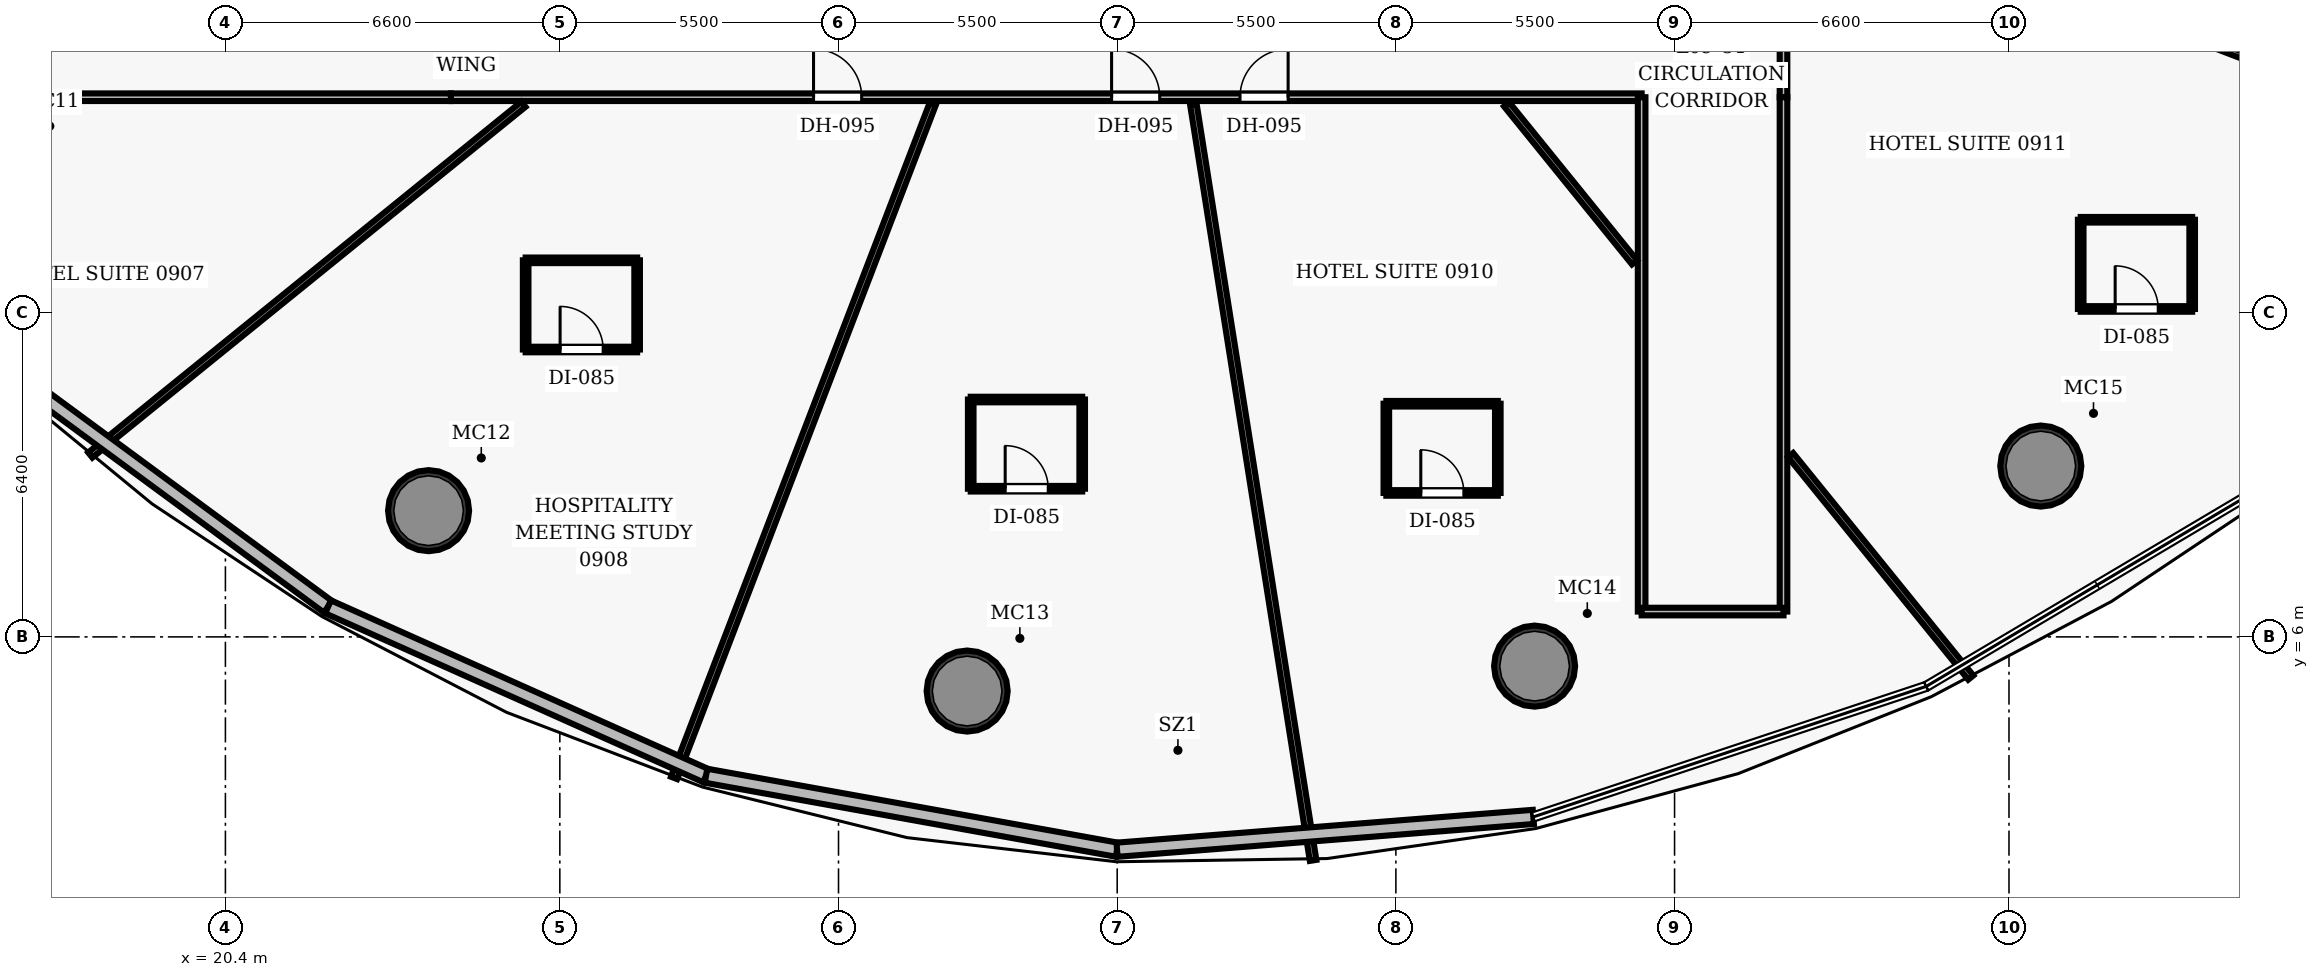
"""IFC4 building model, lengths in metres.
Left out: names, types, materials, properties, quantities, classifications, styles, units other than length and angle.
Written with IfcOpenShell. Run it as: python <this file> out.ifc"""

import sys

from ifc_helpers import new_model, si_unit, direction, frame, frame_2d, origin, origin_2d, place, context, subcontext, project, spatial, rectangle, hollow_circle, extrude, element, fill, save


model = new_model("IFC4")
c1 = context("Model", 3, precision=1e-05, world=origin(), true_north=direction((0.0, 1.0)))
c2 = subcontext(c1, "Body", "Model", "MODEL_VIEW")
j1 = project(units=[si_unit("LENGTHUNIT", "METRE"), si_unit("PLANEANGLEUNIT", "RADIAN")], contexts=[c1])
p1 = place(None, origin())
s1 = spatial("IfcSite", under=j1, at=p1, CompositionType="ELEMENT")
p2 = place(p1, origin())
s2 = spatial("IfcBuilding", under=s1, at=p2, CompositionType="ELEMENT")
p3 = place(p2, frame((0.0, 0.0, 48.4)))
s3 = spatial("IfcBuildingStorey", under=s2, at=p3, CompositionType="ELEMENT", Elevation=48.4)
for number, where, z_axis, x_axis in (
    (1, (24.41, 8.491, 0.0), (0.0, 0.0, 1.0), (1.0, 0.0, 0.0)),
    (2, (35.039, 4.931, 0.0), (0.0, 0.0, 1.0), (1.0, 0.0, 0.0)),
    (3, (46.238, 5.423, 0.0), (0.0, 0.0, 1.0), (1.0, 0.0, 0.0)),
    (4, (56.228, 9.371, 0.0), (0.0, 0.0, 1.0), (1.0, 0.0, 0.0)),
):
    element("IfcColumn", number, at=place(p3, frame(where, z_axis=z_axis, x_axis=x_axis)), inside=s3, PredefinedType="COLUMN", context=c2, shape_type="SweptSolid", body=[
        extrude(hollow_circle(Radius=0.8, WallThickness=0.06, at=origin_2d()), origin(), (0.0, 0.0, 1.0), 3.5),
    ])
p4 = place(p3, frame((24.85, 16.65, 0.0), z_axis=(0.0, 0.0, 1.0), x_axis=(1.0, 0.0, 0.0)))
e5 = element("IfcWall", 5, at=p4, inside=s3, PredefinedType="PARTITIONING", context=c2, shape_type="SweptSolid", body=[
    extrude(rectangle(XDim=23.5, YDim=0.15, at=frame_2d((11.75, 0.0))), origin(), (0.0, 0.0, 1.0), 2.6),
])
p5 = place(p4, frame((7.157, 0.0, 0.0)))
e6 = element("IfcOpeningElement", 6, at=p5, cuts=e5, PredefinedType="OPENING", context=c2, shape_type="SweptSolid", body=[
    extrude(rectangle(XDim=0.95, YDim=2.15, at=frame_2d((0.475, 1.075))), frame((0.0, 0.085, 0.0), z_axis=(0.0, -1.0, 0.0), x_axis=(1.0, 0.0, 0.0)), (0.0, 0.0, 1.0), 0.17),
])
p6 = place(p4, frame((13.039, 0.0, 0.0)))
e7 = element("IfcOpeningElement", 7, at=p6, cuts=e5, PredefinedType="OPENING", context=c2, shape_type="SweptSolid", body=[
    extrude(rectangle(XDim=0.95, YDim=2.15, at=frame_2d((0.475, 1.075))), frame((0.0, 0.085, 0.0), z_axis=(0.0, -1.0, 0.0), x_axis=(1.0, 0.0, 0.0)), (0.0, 0.0, 1.0), 0.17),
])
p7 = place(p4, frame((15.573, 0.0, 0.0)))
e8 = element("IfcOpeningElement", 8, at=p7, cuts=e5, PredefinedType="OPENING", context=c2, shape_type="SweptSolid", body=[
    extrude(rectangle(XDim=0.95, YDim=2.15, at=frame_2d((0.475, 1.075))), frame((0.0, 0.085, 0.0), z_axis=(0.0, -1.0, 0.0), x_axis=(1.0, 0.0, 0.0)), (0.0, 0.0, 1.0), 0.17),
])
p8 = place(p3, frame((51.15, 16.65, 0.0), z_axis=(0.0, 0.0, 1.0), x_axis=(0.0, 1.0, 0.0)))
e9 = element("IfcWall", 9, at=p8, inside=s3, PredefinedType="PARTITIONING", context=c2, shape_type="SweptSolid", body=[
    extrude(rectangle(XDim=15.9, YDim=0.15, at=frame_2d((7.95, 0.0))), origin(), (0.0, 0.0, 1.0), 2.6),
])
p9 = place(p8, frame((2.484, 0.0, 0.0)))
e10 = element("IfcOpeningElement", 10, at=p9, cuts=e9, PredefinedType="OPENING", context=c2, shape_type="SweptSolid", body=[
    extrude(rectangle(XDim=0.95, YDim=2.15, at=frame_2d((0.475, 1.075))), frame((0.0, 0.085, 0.0), z_axis=(0.0, -1.0, 0.0), x_axis=(1.0, 0.0, 0.0)), (0.0, 0.0, 1.0), 0.17),
])
p10 = place(p8, frame((7.379, 0.0, 0.0)))
e11 = element("IfcOpeningElement", 11, at=p10, cuts=e9, PredefinedType="OPENING", context=c2, shape_type="SweptSolid", body=[
    extrude(rectangle(XDim=0.95, YDim=2.15, at=frame_2d((0.475, 1.075))), frame((0.0, 0.085, 0.0), z_axis=(0.0, -1.0, 0.0), x_axis=(1.0, 0.0, 0.0)), (0.0, 0.0, 1.0), 0.17),
])
p11 = place(p3, frame((12.206, 16.65, 0.0), z_axis=(0.0, 0.0, 1.0), x_axis=(1.0, 0.0, 0.0)))
e12 = element("IfcWall", 12, at=p11, inside=s3, PredefinedType="PARTITIONING", context=c2, shape_type="SweptSolid", body=[
    extrude(rectangle(XDim=12.644, YDim=0.15, at=frame_2d((6.322, 0.0))), origin(), (0.0, 0.0, 1.0), 2.6),
])
for number, where, z_axis, x_axis in (
    (13, (48.35, 6.5, 0.0), (0.0, 0.0, 1.0), (0.0, 1.0, 0.0)),
    (14, (51.15, 6.5, 0.0), (0.0, 0.0, 1.0), (0.0, 1.0, 0.0)),
):
    element("IfcWall", number, at=place(p3, frame(where, z_axis=z_axis, x_axis=x_axis)), inside=s3, PredefinedType="PARTITIONING", context=c2, shape_type="SweptSolid", body=[
        extrude(rectangle(XDim=10.15, YDim=0.15, at=frame_2d((5.075, 0.0))), origin(), (0.0, 0.0, 1.0), 2.6),
    ])
p12 = place(p3, frame((48.35, 6.5, 0.0), z_axis=(0.0, 0.0, 1.0), x_axis=(1.0, 0.0, 0.0)))
e15 = element("IfcWall", 15, at=p12, inside=s3, PredefinedType="PARTITIONING", context=c2, shape_type="SweptSolid", body=[
    extrude(rectangle(XDim=2.8, YDim=0.15, at=frame_2d((1.4, 0.0))), origin(), (0.0, 0.0, 1.0), 2.6),
])
p13 = place(p3, frame((26.281, 16.51, 0.0), z_axis=(0.0, 0.0, 1.0), x_axis=(-0.777143021666, -0.629324021372, 0.0)))
e16 = element("IfcWall", 16, at=p13, inside=s3, PredefinedType="PARTITIONING", context=c2, shape_type="SweptSolid", body=[
    extrude(rectangle(XDim=10.998, YDim=0.13, at=frame_2d((5.499, 0.0))), origin(), (0.0, 0.0, 1.0), 2.6),
])
p14 = place(p3, frame((34.357, 16.51, 0.0), z_axis=(0.0, 0.0, 1.0), x_axis=(-0.358367757611, -0.933580500174, 0.0)))
e17 = element("IfcWall", 17, at=p14, inside=s3, PredefinedType="PARTITIONING", context=c2, shape_type="SweptSolid", body=[
    extrude(rectangle(XDim=14.239, YDim=0.13, at=frame_2d((7.12, 0.0))), origin(), (0.0, 0.0, 1.0), 2.6),
])
p15 = place(p3, frame((39.503, 16.51, 0.0), z_axis=(0.0, 0.0, 1.0), x_axis=(0.156421482908, -0.987690396675, 0.0)))
e18 = element("IfcWall", 18, at=p15, inside=s3, PredefinedType="PARTITIONING", context=c2, shape_type="SweptSolid", body=[
    extrude(rectangle(XDim=15.107, YDim=0.13, at=frame_2d((7.553, 0.0))), origin(), (0.0, 0.0, 1.0), 2.6),
])
p16 = place(p3, frame((45.685, 16.51, 0.0), z_axis=(0.0, 0.0, 1.0), x_axis=(0.629306741086, -0.777157014782, 0.0)))
e19 = element("IfcWall", 19, at=p16, inside=s3, PredefinedType="PARTITIONING", context=c2, shape_type="SweptSolid", body=[
    extrude(rectangle(XDim=4.013, YDim=0.13, at=frame_2d((2.006, 0.0))), origin(), (0.0, 0.0, 1.0), 2.6),
])
p17 = place(p3, frame((51.29, 9.588, 0.0), z_axis=(0.0, 0.0, 1.0), x_axis=(0.629326246379, -0.777141219868, 0.0)))
e20 = element("IfcWall", 20, at=p17, inside=s3, PredefinedType="PARTITIONING", context=c2, shape_type="SweptSolid", body=[
    extrude(rectangle(XDim=5.65, YDim=0.13, at=frame_2d((2.825, 0.0))), origin(), (0.0, 0.0, 1.0), 2.6),
])
p18 = place(p3, frame((51.29, 20.898, 0.0), z_axis=(0.0, 0.0, 1.0), x_axis=(0.933579150915, -0.358371272533, 0.0)))
e21 = element("IfcWall", 21, at=p18, inside=s3, PredefinedType="PARTITIONING", context=c2, shape_type="SweptSolid", body=[
    extrude(rectangle(XDim=16.879, YDim=0.13, at=frame_2d((8.439, 0.0))), origin(), (0.0, 0.0, 1.0), 2.6),
])
p19 = place(p3, frame((26.326, 11.671, 0.0), z_axis=(0.0, 0.0, 1.0), x_axis=(1.0, 0.0, 0.0)))
e22 = element("IfcWall", 22, at=p19, inside=s3, PredefinedType="PARTITIONING", context=c2, shape_type="SweptSolid", body=[
    extrude(rectangle(XDim=2.2, YDim=0.11, at=frame_2d((1.1, 0.0))), origin(), (0.0, 0.0, 1.0), 2.6),
])
p20 = place(p19, frame((0.68, 0.0, 0.0)))
e23 = element("IfcOpeningElement", 23, at=p20, cuts=e22, PredefinedType="OPENING", context=c2, shape_type="SweptSolid", body=[
    extrude(rectangle(XDim=0.85, YDim=2.1, at=frame_2d((0.425, 1.05))), frame((0.0, 0.065, 0.0), z_axis=(0.0, -1.0, 0.0), x_axis=(1.0, 0.0, 0.0)), (0.0, 0.0, 1.0), 0.13),
])
p21 = place(p3, frame((26.326, 13.431, 0.0), z_axis=(0.0, 0.0, 1.0), x_axis=(1.0, 0.0, 0.0)))
e24 = element("IfcWall", 24, at=p21, inside=s3, PredefinedType="PARTITIONING", context=c2, shape_type="SweptSolid", body=[
    extrude(rectangle(XDim=2.2, YDim=0.11, at=frame_2d((1.1, 0.0))), origin(), (0.0, 0.0, 1.0), 2.6),
])
for number, where, z_axis, x_axis in (
    (25, (26.326, 11.671, 0.0), (0.0, 0.0, 1.0), (0.0, 1.0, 0.0)),
    (26, (28.526, 11.671, 0.0), (0.0, 0.0, 1.0), (0.0, 1.0, 0.0)),
):
    element("IfcWall", number, at=place(p3, frame(where, z_axis=z_axis, x_axis=x_axis)), inside=s3, PredefinedType="PARTITIONING", context=c2, shape_type="SweptSolid", body=[
        extrude(rectangle(XDim=1.76, YDim=0.11, at=frame_2d((0.88, 0.0))), origin(), (0.0, 0.0, 1.0), 2.6),
    ])
p22 = place(p3, frame((35.109, 8.924, 0.0), z_axis=(0.0, 0.0, 1.0), x_axis=(1.0, 0.0, 0.0)))
e27 = element("IfcWall", 27, at=p22, inside=s3, PredefinedType="PARTITIONING", context=c2, shape_type="SweptSolid", body=[
    extrude(rectangle(XDim=2.2, YDim=0.11, at=frame_2d((1.1, 0.0))), origin(), (0.0, 0.0, 1.0), 2.6),
])
p23 = place(p22, frame((0.68, 0.0, 0.0)))
e28 = element("IfcOpeningElement", 28, at=p23, cuts=e27, PredefinedType="OPENING", context=c2, shape_type="SweptSolid", body=[
    extrude(rectangle(XDim=0.85, YDim=2.1, at=frame_2d((0.425, 1.05))), frame((0.0, 0.065, 0.0), z_axis=(0.0, -1.0, 0.0), x_axis=(1.0, 0.0, 0.0)), (0.0, 0.0, 1.0), 0.13),
])
p24 = place(p3, frame((35.109, 10.684, 0.0), z_axis=(0.0, 0.0, 1.0), x_axis=(1.0, 0.0, 0.0)))
e29 = element("IfcWall", 29, at=p24, inside=s3, PredefinedType="PARTITIONING", context=c2, shape_type="SweptSolid", body=[
    extrude(rectangle(XDim=2.2, YDim=0.11, at=frame_2d((1.1, 0.0))), origin(), (0.0, 0.0, 1.0), 2.6),
])
for number, where, z_axis, x_axis in (
    (30, (35.109, 8.924, 0.0), (0.0, 0.0, 1.0), (0.0, 1.0, 0.0)),
    (31, (37.309, 8.924, 0.0), (0.0, 0.0, 1.0), (0.0, 1.0, 0.0)),
):
    element("IfcWall", number, at=place(p3, frame(where, z_axis=z_axis, x_axis=x_axis)), inside=s3, PredefinedType="PARTITIONING", context=c2, shape_type="SweptSolid", body=[
        extrude(rectangle(XDim=1.76, YDim=0.11, at=frame_2d((0.88, 0.0))), origin(), (0.0, 0.0, 1.0), 2.6),
    ])
p25 = place(p3, frame((43.312, 8.841, 0.0), z_axis=(0.0, 0.0, 1.0), x_axis=(1.0, 0.0, 0.0)))
e32 = element("IfcWall", 32, at=p25, inside=s3, PredefinedType="PARTITIONING", context=c2, shape_type="SweptSolid", body=[
    extrude(rectangle(XDim=2.2, YDim=0.11, at=frame_2d((1.1, 0.0))), origin(), (0.0, 0.0, 1.0), 2.6),
])
p26 = place(p25, frame((0.68, 0.0, 0.0)))
e33 = element("IfcOpeningElement", 33, at=p26, cuts=e32, PredefinedType="OPENING", context=c2, shape_type="SweptSolid", body=[
    extrude(rectangle(XDim=0.85, YDim=2.1, at=frame_2d((0.425, 1.05))), frame((0.0, 0.065, 0.0), z_axis=(0.0, -1.0, 0.0), x_axis=(1.0, 0.0, 0.0)), (0.0, 0.0, 1.0), 0.13),
])
p27 = place(p3, frame((43.312, 10.601, 0.0), z_axis=(0.0, 0.0, 1.0), x_axis=(1.0, 0.0, 0.0)))
e34 = element("IfcWall", 34, at=p27, inside=s3, PredefinedType="PARTITIONING", context=c2, shape_type="SweptSolid", body=[
    extrude(rectangle(XDim=2.2, YDim=0.11, at=frame_2d((1.1, 0.0))), origin(), (0.0, 0.0, 1.0), 2.6),
])
for number, where, z_axis, x_axis in (
    (35, (43.312, 8.841, 0.0), (0.0, 0.0, 1.0), (0.0, 1.0, 0.0)),
    (36, (45.512, 8.841, 0.0), (0.0, 0.0, 1.0), (0.0, 1.0, 0.0)),
):
    element("IfcWall", number, at=place(p3, frame(where, z_axis=z_axis, x_axis=x_axis)), inside=s3, PredefinedType="PARTITIONING", context=c2, shape_type="SweptSolid", body=[
        extrude(rectangle(XDim=1.76, YDim=0.11, at=frame_2d((0.88, 0.0))), origin(), (0.0, 0.0, 1.0), 2.6),
    ])
p28 = place(p3, frame((57.015, 12.472, 0.0), z_axis=(0.0, 0.0, 1.0), x_axis=(1.0, 0.0, 0.0)))
e37 = element("IfcWall", 37, at=p28, inside=s3, PredefinedType="PARTITIONING", context=c2, shape_type="SweptSolid", body=[
    extrude(rectangle(XDim=2.2, YDim=0.11, at=frame_2d((1.1, 0.0))), origin(), (0.0, 0.0, 1.0), 2.6),
])
p29 = place(p28, frame((0.68, 0.0, 0.0)))
e38 = element("IfcOpeningElement", 38, at=p29, cuts=e37, PredefinedType="OPENING", context=c2, shape_type="SweptSolid", body=[
    extrude(rectangle(XDim=0.85, YDim=2.1, at=frame_2d((0.425, 1.05))), frame((0.0, 0.065, 0.0), z_axis=(0.0, -1.0, 0.0), x_axis=(1.0, 0.0, 0.0)), (0.0, 0.0, 1.0), 0.13),
])
p30 = place(p3, frame((57.015, 14.232, 0.0), z_axis=(0.0, 0.0, 1.0), x_axis=(1.0, 0.0, 0.0)))
e39 = element("IfcWall", 39, at=p30, inside=s3, PredefinedType="PARTITIONING", context=c2, shape_type="SweptSolid", body=[
    extrude(rectangle(XDim=2.2, YDim=0.11, at=frame_2d((1.1, 0.0))), origin(), (0.0, 0.0, 1.0), 2.6),
])
for number, where, z_axis, x_axis in (
    (40, (57.015, 12.472, 0.0), (0.0, 0.0, 1.0), (0.0, 1.0, 0.0)),
    (41, (59.216, 12.472, 0.0), (0.0, 0.0, 1.0), (0.0, 1.0, 0.0)),
):
    element("IfcWall", number, at=place(p3, frame(where, z_axis=z_axis, x_axis=x_axis)), inside=s3, PredefinedType="PARTITIONING", context=c2, shape_type="SweptSolid", body=[
        extrude(rectangle(XDim=1.76, YDim=0.11, at=frame_2d((0.88, 0.0))), origin(), (0.0, 0.0, 1.0), 2.6),
    ])
p31 = place(p3, frame((22.426, 6.594, 0.0), z_axis=(0.0, 0.0, 1.0), x_axis=(-0.805234930247, 0.592955906547, 0.0)))
e42 = element("IfcWall", 42, at=p31, inside=s3, PredefinedType="SOLIDWALL", context=c2, shape_type="SweptSolid", body=[
    extrude(rectangle(XDim=7.845, YDim=0.28, at=frame_2d((3.922, 0.0))), origin(), (0.0, 0.0, 1.0), 3.25),
])
p32 = place(p3, frame((29.886, 3.26, 0.0), z_axis=(0.0, 0.0, 1.0), x_axis=(-0.913005158839, 0.407948011311, 0.0)))
e43 = element("IfcWall", 43, at=p32, inside=s3, PredefinedType="SOLIDWALL", context=c2, shape_type="SweptSolid", body=[
    extrude(rectangle(XDim=8.171, YDim=0.28, at=frame_2d((4.085, 0.0))), origin(), (0.0, 0.0, 1.0), 3.25),
])
p33 = place(p3, frame((37.997, 1.8, 0.0), z_axis=(0.0, 0.0, 1.0), x_axis=(-0.984172785639, 0.177211534636, 0.0)))
e44 = element("IfcWall", 44, at=p33, inside=s3, PredefinedType="SOLIDWALL", context=c2, shape_type="SweptSolid", body=[
    extrude(rectangle(XDim=8.241, YDim=0.28, at=frame_2d((4.121, 0.0))), origin(), (0.0, 0.0, 1.0), 3.25),
])
p34 = place(p3, frame((46.213, 2.448, 0.0), z_axis=(0.0, 0.0, 1.0), x_axis=(-0.996907010913, -0.078590149465, 0.0)))
e45 = element("IfcWall", 45, at=p34, inside=s3, PredefinedType="SOLIDWALL", context=c2, shape_type="SweptSolid", body=[
    extrude(rectangle(XDim=8.241, YDim=0.28, at=frame_2d((4.121, 0.0))), origin(), (0.0, 0.0, 1.0), 3.25),
])
p35 = place(p5, origin())
e46 = element("IfcDoor", 46, at=p35, inside=s3, OperationType="SINGLE_SWING_LEFT", PredefinedType="DOOR", context=c2, shape_type="SweptSolid", body=[
    extrude(rectangle(XDim=0.95, YDim=2.15, at=frame_2d((0.475, 1.075))), frame((0.0, 0.025, 0.0), z_axis=(0.0, -1.0, 0.0), x_axis=(1.0, 0.0, 0.0)), (0.0, 0.0, 1.0), 0.05),
])
fill(e6, e46)
p36 = place(p20, origin())
e47 = element("IfcDoor", 47, at=p36, inside=s3, OperationType="SINGLE_SWING_LEFT", PredefinedType="DOOR", context=c2, shape_type="SweptSolid", body=[
    extrude(rectangle(XDim=0.85, YDim=2.1, at=frame_2d((0.425, 1.05))), frame((0.0, 0.025, 0.0), z_axis=(0.0, -1.0, 0.0), x_axis=(1.0, 0.0, 0.0)), (0.0, 0.0, 1.0), 0.05),
])
fill(e23, e47)
p37 = place(p6, origin())
e48 = element("IfcDoor", 48, at=p37, inside=s3, OperationType="SINGLE_SWING_LEFT", PredefinedType="DOOR", context=c2, shape_type="SweptSolid", body=[
    extrude(rectangle(XDim=0.95, YDim=2.15, at=frame_2d((0.475, 1.075))), frame((0.0, 0.025, 0.0), z_axis=(0.0, -1.0, 0.0), x_axis=(1.0, 0.0, 0.0)), (0.0, 0.0, 1.0), 0.05),
])
fill(e7, e48)
p38 = place(p23, origin())
e49 = element("IfcDoor", 49, at=p38, inside=s3, OperationType="SINGLE_SWING_LEFT", PredefinedType="DOOR", context=c2, shape_type="SweptSolid", body=[
    extrude(rectangle(XDim=0.85, YDim=2.1, at=frame_2d((0.425, 1.05))), frame((0.0, 0.025, 0.0), z_axis=(0.0, -1.0, 0.0), x_axis=(1.0, 0.0, 0.0)), (0.0, 0.0, 1.0), 0.05),
])
fill(e28, e49)
p39 = place(p7, origin())
e50 = element("IfcDoor", 50, at=p39, inside=s3, OperationType="SINGLE_SWING_RIGHT", PredefinedType="DOOR", context=c2, shape_type="SweptSolid", body=[
    extrude(rectangle(XDim=0.95, YDim=2.15, at=frame_2d((0.475, 1.075))), frame((0.0, 0.025, 0.0), z_axis=(0.0, -1.0, 0.0), x_axis=(1.0, 0.0, 0.0)), (0.0, 0.0, 1.0), 0.05),
])
fill(e8, e50)
p40 = place(p26, origin())
e51 = element("IfcDoor", 51, at=p40, inside=s3, OperationType="SINGLE_SWING_LEFT", PredefinedType="DOOR", context=c2, shape_type="SweptSolid", body=[
    extrude(rectangle(XDim=0.85, YDim=2.1, at=frame_2d((0.425, 1.05))), frame((0.0, 0.025, 0.0), z_axis=(0.0, -1.0, 0.0), x_axis=(1.0, 0.0, 0.0)), (0.0, 0.0, 1.0), 0.05),
])
fill(e33, e51)
p41 = place(p29, origin())
e52 = element("IfcDoor", 52, at=p41, inside=s3, OperationType="SINGLE_SWING_LEFT", PredefinedType="DOOR", context=c2, shape_type="SweptSolid", body=[
    extrude(rectangle(XDim=0.85, YDim=2.1, at=frame_2d((0.425, 1.05))), frame((0.0, 0.025, 0.0), z_axis=(0.0, -1.0, 0.0), x_axis=(1.0, 0.0, 0.0)), (0.0, 0.0, 1.0), 0.05),
])
fill(e38, e52)
save(model, sys.argv[1])
